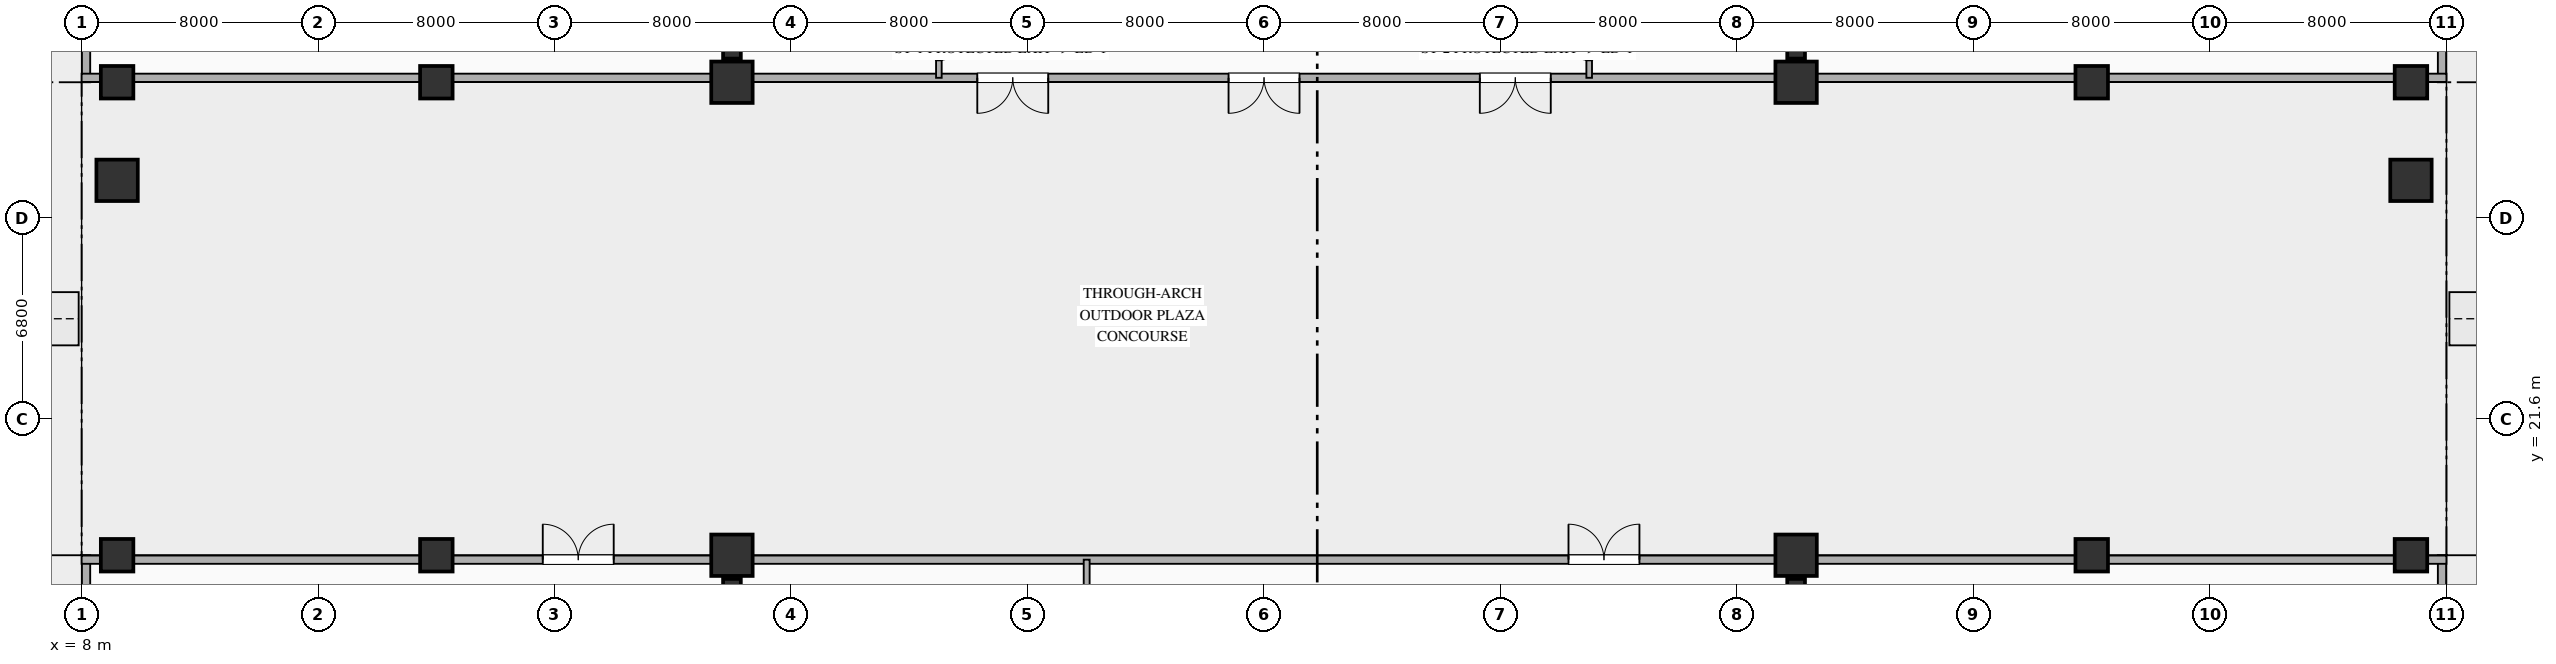
"""IFC4 building model, lengths in metres.
Left out: names, types, materials, properties, quantities, classifications, styles, units other than length and angle.
Written with IfcOpenShell. Run it as: python <this file> out.ifc"""

import sys

from ifc_helpers import new_model, si_unit, direction, frame, frame_2d, origin, origin_2d, place, context, subcontext, project, spatial, rectangle, extrude, element, fill, save


model = new_model("IFC4")
c1 = context("Model", 3, precision=1e-05, world=origin(), true_north=direction((0.0, 1.0)))
c2 = subcontext(c1, "Body", "Model", "MODEL_VIEW")
j1 = project(units=[si_unit("LENGTHUNIT", "METRE"), si_unit("PLANEANGLEUNIT", "RADIAN")], contexts=[c1])
p1 = place(None, origin())
s1 = spatial("IfcSite", under=j1, at=p1, CompositionType="ELEMENT")
p2 = place(p1, origin())
s2 = spatial("IfcBuilding", under=s1, at=p2, CompositionType="ELEMENT")
p3 = place(p2, origin())
s3 = spatial("IfcBuildingStorey", under=s2, at=p3, CompositionType="ELEMENT", Elevation=0.0)
for number, where, z_axis, x_axis in (
    (1, (9.2, 17.0, 0.0), (0.0, 0.0, 1.0), (1.0, 0.0, 0.0)),
    (2, (86.8, 17.0, 0.0), (0.0, 0.0, 1.0), (1.0, 0.0, 0.0)),
    (3, (9.2, 33.0, 0.0), (0.0, 0.0, 1.0), (1.0, 0.0, 0.0)),
    (4, (86.8, 33.0, 0.0), (0.0, 0.0, 1.0), (1.0, 0.0, 0.0)),
    (5, (20.0, 17.0, 0.0), (0.0, 0.0, 1.0), (1.0, 0.0, 0.0)),
):
    element("IfcColumn", number, at=place(p3, frame(where, z_axis=z_axis, x_axis=x_axis)), inside=s3, PredefinedType="COLUMN", context=c2, shape_type="SweptSolid", body=[
        extrude(rectangle(XDim=1.1, YDim=1.1, at=origin_2d()), origin(), (0.0, 0.0, 1.0), 5.72),
    ])
for number, where, z_axis, x_axis in (
    (6, (30.0, 17.0, 0.0), (0.0, 0.0, 1.0), (1.0, 0.0, 0.0)),
    (7, (66.0, 17.0, 0.0), (0.0, 0.0, 1.0), (1.0, 0.0, 0.0)),
):
    element("IfcColumn", number, at=place(p3, frame(where, z_axis=z_axis, x_axis=x_axis)), inside=s3, PredefinedType="COLUMN", context=c2, shape_type="SweptSolid", body=[
        extrude(rectangle(XDim=1.4, YDim=1.4, at=origin_2d()), origin(), (0.0, 0.0, 1.0), 5.72),
    ])
for number, where, z_axis, x_axis in (
    (8, (76.0, 17.0, 0.0), (0.0, 0.0, 1.0), (1.0, 0.0, 0.0)),
    (9, (20.0, 33.0, 0.0), (0.0, 0.0, 1.0), (1.0, 0.0, 0.0)),
):
    element("IfcColumn", number, at=place(p3, frame(where, z_axis=z_axis, x_axis=x_axis)), inside=s3, PredefinedType="COLUMN", context=c2, shape_type="SweptSolid", body=[
        extrude(rectangle(XDim=1.1, YDim=1.1, at=origin_2d()), origin(), (0.0, 0.0, 1.0), 5.72),
    ])
for number, where, z_axis, x_axis in (
    (10, (30.0, 33.0, 0.0), (0.0, 0.0, 1.0), (1.0, 0.0, 0.0)),
    (11, (66.0, 33.0, 0.0), (0.0, 0.0, 1.0), (1.0, 0.0, 0.0)),
):
    element("IfcColumn", number, at=place(p3, frame(where, z_axis=z_axis, x_axis=x_axis)), inside=s3, PredefinedType="COLUMN", context=c2, shape_type="SweptSolid", body=[
        extrude(rectangle(XDim=1.4, YDim=1.4, at=origin_2d()), origin(), (0.0, 0.0, 1.0), 5.72),
    ])
p4 = place(p3, frame((76.0, 33.0, 0.0), z_axis=(0.0, 0.0, 1.0), x_axis=(1.0, 0.0, 0.0)))
e12 = element("IfcColumn", 12, at=p4, inside=s3, PredefinedType="COLUMN", context=c2, shape_type="SweptSolid", body=[
    extrude(rectangle(XDim=1.1, YDim=1.1, at=origin_2d()), origin(), (0.0, 0.0, 1.0), 5.72),
])
for number, where, z_axis, x_axis in (
    (13, (9.2, 29.682, 0.0), (0.0, 0.0, 1.0), (1.0, 0.0, 0.0)),
    (14, (86.8, 29.682, 0.0), (0.0, 0.0, 1.0), (1.0, 0.0, 0.0)),
):
    element("IfcColumn", number, at=place(p3, frame(where, z_axis=z_axis, x_axis=x_axis)), inside=s3, PredefinedType="COLUMN", context=c2, shape_type="SweptSolid", body=[
        extrude(rectangle(XDim=1.4, YDim=1.4, at=origin_2d()), origin(), (0.0, 0.0, 1.0), 6.0),
    ])
for number, where, z_axis, x_axis in (
    (15, (30.0, 15.75, 0.0), (0.0, 0.0, 1.0), (1.0, 0.0, 0.0)),
    (16, (30.0, 34.25, 0.0), (0.0, 0.0, 1.0), (1.0, 0.0, 0.0)),
    (17, (66.0, 15.75, 0.0), (0.0, 0.0, 1.0), (1.0, 0.0, 0.0)),
    (18, (66.0, 34.25, 0.0), (0.0, 0.0, 1.0), (1.0, 0.0, 0.0)),
):
    element("IfcColumn", number, at=place(p3, frame(where, z_axis=z_axis, x_axis=x_axis)), inside=s3, PredefinedType="PILASTER", context=c2, shape_type="SweptSolid", body=[
        extrude(rectangle(XDim=0.6, YDim=0.9, at=origin_2d()), origin(), (0.0, 0.0, 1.0), 5.72),
    ])
p5 = place(p3, frame((8.15, 33.0, 0.0), z_axis=(0.0, 0.0, 1.0), x_axis=(0.0, 1.0, 0.0)))
e19 = element("IfcWall", 19, at=p5, inside=s3, PredefinedType="SOLIDWALL", context=c2, shape_type="SweptSolid", body=[
    extrude(rectangle(XDim=41.35, YDim=0.28, at=frame_2d((20.675, 0.0))), origin(), (0.0, 0.0, 1.0), 5.72),
])
p6 = place(p5, frame((33.6, 0.0, 0.0)))
e20 = element("IfcOpeningElement", 20, at=p6, cuts=e19, PredefinedType="OPENING", context=c2, shape_type="SweptSolid", body=[
    extrude(rectangle(XDim=2.4, YDim=2.6, at=frame_2d((1.2, 1.3))), frame((0.0, 0.15, 0.0), z_axis=(0.0, -1.0, 0.0), x_axis=(1.0, 0.0, 0.0)), (0.0, 0.0, 1.0), 0.3),
])
p7 = place(p5, frame((7.675, 0.0, 0.9)))
e21 = element("IfcOpeningElement", 21, at=p7, cuts=e19, PredefinedType="OPENING", context=c2, shape_type="SweptSolid", body=[
    extrude(rectangle(XDim=2.4, YDim=2.6, at=frame_2d((1.2, 1.3))), frame((0.0, 0.15, 0.0), z_axis=(0.0, -1.0, 0.0), x_axis=(1.0, 0.0, 0.0)), (0.0, 0.0, 1.0), 0.3),
])
p8 = place(p5, frame((21.225, 0.0, 0.9)))
e22 = element("IfcOpeningElement", 22, at=p8, cuts=e19, PredefinedType="OPENING", context=c2, shape_type="SweptSolid", body=[
    extrude(rectangle(XDim=2.4, YDim=2.6, at=frame_2d((1.2, 1.3))), frame((0.0, 0.15, 0.0), z_axis=(0.0, -1.0, 0.0), x_axis=(1.0, 0.0, 0.0)), (0.0, 0.0, 1.0), 0.3),
])
p9 = place(p3, frame((87.85, 74.35, 0.0), z_axis=(0.0, 0.0, 1.0), x_axis=(0.0, -1.0, 0.0)))
e23 = element("IfcWall", 23, at=p9, inside=s3, PredefinedType="SOLIDWALL", context=c2, shape_type="SweptSolid", body=[
    extrude(rectangle(XDim=41.35, YDim=0.28, at=frame_2d((20.675, 0.0))), origin(), (0.0, 0.0, 1.0), 5.72),
])
p10 = place(p9, frame((5.35, 0.0, 0.0)))
e24 = element("IfcOpeningElement", 24, at=p10, cuts=e23, PredefinedType="OPENING", context=c2, shape_type="SweptSolid", body=[
    extrude(rectangle(XDim=2.4, YDim=2.6, at=frame_2d((1.2, 1.3))), frame((0.0, 0.15, 0.0), z_axis=(0.0, -1.0, 0.0), x_axis=(1.0, 0.0, 0.0)), (0.0, 0.0, 1.0), 0.3),
])
p11 = place(p9, frame((14.15, 0.0, 0.0)))
e25 = element("IfcOpeningElement", 25, at=p11, cuts=e23, PredefinedType="OPENING", context=c2, shape_type="SweptSolid", body=[
    extrude(rectangle(XDim=4.2, YDim=4.2, at=frame_2d((2.1, 2.1))), frame((0.0, 0.15, 0.0), z_axis=(0.0, -1.0, 0.0), x_axis=(1.0, 0.0, 0.0)), (0.0, 0.0, 1.0), 0.3),
])
p12 = place(p9, frame((31.275, 0.0, 0.9)))
e26 = element("IfcOpeningElement", 26, at=p12, cuts=e23, PredefinedType="OPENING", context=c2, shape_type="SweptSolid", body=[
    extrude(rectangle(XDim=2.4, YDim=2.6, at=frame_2d((1.2, 1.3))), frame((0.0, 0.15, 0.0), z_axis=(0.0, -1.0, 0.0), x_axis=(1.0, 0.0, 0.0)), (0.0, 0.0, 1.0), 0.3),
])
for number, where, z_axis, x_axis in (
    (27, (8.15, 17.0, 0.0), (0.0, 0.0, 1.0), (0.0, -1.0, 0.0)),
    (28, (87.85, 9.65, 0.0), (0.0, 0.0, 1.0), (0.0, 1.0, 0.0)),
):
    element("IfcWall", number, at=place(p3, frame(where, z_axis=z_axis, x_axis=x_axis)), inside=s3, PredefinedType="SOLIDWALL", context=c2, shape_type="SweptSolid", body=[
        extrude(rectangle(XDim=7.35, YDim=0.28, at=frame_2d((3.675, 0.0))), origin(), (0.0, 0.0, 1.0), 5.72),
    ])
p13 = place(p3, frame((88.0, 33.15, 0.0), z_axis=(0.0, 0.0, 1.0), x_axis=(-1.0, 0.0, 0.0)))
e29 = element("IfcWall", 29, at=p13, inside=s3, PredefinedType="SOLIDWALL", context=c2, shape_type="SweptSolid", body=[
    extrude(rectangle(XDim=80.0, YDim=0.28, at=frame_2d((40.0, 0.0))), origin(), (0.0, 0.0, 1.0), 5.72),
])
p14 = place(p13, frame((47.3, 0.0, 0.0)))
e30 = element("IfcOpeningElement", 30, at=p14, cuts=e29, PredefinedType="OPENING", context=c2, shape_type="SweptSolid", body=[
    extrude(rectangle(XDim=2.4, YDim=2.6, at=frame_2d((1.2, 1.3))), frame((0.0, 0.15, 0.0), z_axis=(0.0, -1.0, 0.0), x_axis=(1.0, 0.0, 0.0)), (0.0, 0.0, 1.0), 0.3),
])
p15 = place(p13, frame((38.8, 0.0, 0.0)))
e31 = element("IfcOpeningElement", 31, at=p15, cuts=e29, PredefinedType="OPENING", context=c2, shape_type="SweptSolid", body=[
    extrude(rectangle(XDim=2.4, YDim=2.6, at=frame_2d((1.2, 1.3))), frame((0.0, 0.15, 0.0), z_axis=(0.0, -1.0, 0.0), x_axis=(1.0, 0.0, 0.0)), (0.0, 0.0, 1.0), 0.3),
])
p16 = place(p13, frame((30.3, 0.0, 0.0)))
e32 = element("IfcOpeningElement", 32, at=p16, cuts=e29, PredefinedType="OPENING", context=c2, shape_type="SweptSolid", body=[
    extrude(rectangle(XDim=2.4, YDim=2.6, at=frame_2d((1.2, 1.3))), frame((0.0, 0.15, 0.0), z_axis=(0.0, -1.0, 0.0), x_axis=(1.0, 0.0, 0.0)), (0.0, 0.0, 1.0), 0.3),
])
p17 = place(p3, frame((8.0, 16.85, 0.0), z_axis=(0.0, 0.0, 1.0), x_axis=(1.0, 0.0, 0.0)))
e33 = element("IfcWall", 33, at=p17, inside=s3, PredefinedType="SOLIDWALL", context=c2, shape_type="SweptSolid", body=[
    extrude(rectangle(XDim=80.0, YDim=0.28, at=frame_2d((40.0, 0.0))), origin(), (0.0, 0.0, 1.0), 5.72),
])
p18 = place(p17, frame((15.6, 0.0, 0.0)))
e34 = element("IfcOpeningElement", 34, at=p18, cuts=e33, PredefinedType="OPENING", context=c2, shape_type="SweptSolid", body=[
    extrude(rectangle(XDim=2.4, YDim=2.6, at=frame_2d((1.2, 1.3))), frame((0.0, 0.15, 0.0), z_axis=(0.0, -1.0, 0.0), x_axis=(1.0, 0.0, 0.0)), (0.0, 0.0, 1.0), 0.3),
])
p19 = place(p17, frame((50.3, 0.0, 0.0)))
e35 = element("IfcOpeningElement", 35, at=p19, cuts=e33, PredefinedType="OPENING", context=c2, shape_type="SweptSolid", body=[
    extrude(rectangle(XDim=2.4, YDim=2.6, at=frame_2d((1.2, 1.3))), frame((0.0, 0.15, 0.0), z_axis=(0.0, -1.0, 0.0), x_axis=(1.0, 0.0, 0.0)), (0.0, 0.0, 1.0), 0.3),
])
p20 = place(p3, frame((42.0, 16.85, 0.0), z_axis=(0.0, 0.0, 1.0), x_axis=(0.0, -1.0, 0.0)))
e36 = element("IfcWall", 36, at=p20, inside=s3, PredefinedType="PARTITIONING", context=c2, shape_type="SweptSolid", body=[
    extrude(rectangle(XDim=6.9, YDim=0.2, at=frame_2d((3.45, 0.0))), origin(), (0.0, 0.0, 1.0), 4.92),
])
p21 = place(p20, frame((2.85, 0.0, 0.0)))
e37 = element("IfcOpeningElement", 37, at=p21, cuts=e36, PredefinedType="OPENING", context=c2, shape_type="SweptSolid", body=[
    extrude(rectangle(XDim=1.2, YDim=2.25, at=frame_2d((0.6, 1.125))), frame((0.0, 0.11, 0.0), z_axis=(0.0, -1.0, 0.0), x_axis=(1.0, 0.0, 0.0)), (0.0, 0.0, 1.0), 0.22),
])
p22 = place(p3, frame((37.0, 35.232, 0.0), z_axis=(0.0, 0.0, 1.0), x_axis=(0.0, -1.0, 0.0)))
e38 = element("IfcWall", 38, at=p22, inside=s3, PredefinedType="PARTITIONING", context=c2, shape_type="SweptSolid", body=[
    extrude(rectangle(XDim=2.082, YDim=0.19, at=frame_2d((1.041, 0.0))), origin(), (0.0, 0.0, 1.0), 4.92),
])
p23 = place(p22, frame((0.591, 0.0, 0.0)))
e39 = element("IfcOpeningElement", 39, at=p23, cuts=e38, PredefinedType="OPENING", context=c2, shape_type="SweptSolid", body=[
    extrude(rectangle(XDim=0.9, YDim=2.15, at=frame_2d((0.45, 1.075))), frame((0.0, 0.105, 0.0), z_axis=(0.0, -1.0, 0.0), x_axis=(1.0, 0.0, 0.0)), (0.0, 0.0, 1.0), 0.21),
])
p24 = place(p3, frame((59.0, 33.15, 0.0), z_axis=(0.0, 0.0, 1.0), x_axis=(0.0, 1.0, 0.0)))
e40 = element("IfcWall", 40, at=p24, inside=s3, PredefinedType="PARTITIONING", context=c2, shape_type="SweptSolid", body=[
    extrude(rectangle(XDim=2.082, YDim=0.19, at=frame_2d((1.041, 0.0))), origin(), (0.0, 0.0, 1.0), 4.92),
])
p25 = place(p24, frame((0.591, 0.0, 0.0)))
e41 = element("IfcOpeningElement", 41, at=p25, cuts=e40, PredefinedType="OPENING", context=c2, shape_type="SweptSolid", body=[
    extrude(rectangle(XDim=0.9, YDim=2.15, at=frame_2d((0.45, 1.075))), frame((0.0, 0.105, 0.0), z_axis=(0.0, -1.0, 0.0), x_axis=(1.0, 0.0, 0.0)), (0.0, 0.0, 1.0), 0.21),
])
p26 = place(p14, origin())
e42 = element("IfcDoor", 42, at=p26, inside=s3, OperationType="DOUBLE_DOOR_SINGLE_SWING", PredefinedType="DOOR", context=c2, shape_type="SweptSolid", body=[
    extrude(rectangle(XDim=2.4, YDim=2.6, at=frame_2d((1.2, 1.3))), frame((0.0, 0.025, 0.0), z_axis=(0.0, -1.0, 0.0), x_axis=(1.0, 0.0, 0.0)), (0.0, 0.0, 1.0), 0.05),
])
fill(e30, e42)
p27 = place(p15, origin())
e43 = element("IfcDoor", 43, at=p27, inside=s3, OperationType="DOUBLE_DOOR_SINGLE_SWING", PredefinedType="DOOR", context=c2, shape_type="SweptSolid", body=[
    extrude(rectangle(XDim=2.4, YDim=2.6, at=frame_2d((1.2, 1.3))), frame((0.0, 0.025, 0.0), z_axis=(0.0, -1.0, 0.0), x_axis=(1.0, 0.0, 0.0)), (0.0, 0.0, 1.0), 0.05),
])
fill(e31, e43)
p28 = place(p16, origin())
e44 = element("IfcDoor", 44, at=p28, inside=s3, OperationType="DOUBLE_DOOR_SINGLE_SWING", PredefinedType="DOOR", context=c2, shape_type="SweptSolid", body=[
    extrude(rectangle(XDim=2.4, YDim=2.6, at=frame_2d((1.2, 1.3))), frame((0.0, 0.025, 0.0), z_axis=(0.0, -1.0, 0.0), x_axis=(1.0, 0.0, 0.0)), (0.0, 0.0, 1.0), 0.05),
])
fill(e32, e44)
p29 = place(p18, origin())
e45 = element("IfcDoor", 45, at=p29, inside=s3, OperationType="DOUBLE_DOOR_SINGLE_SWING", PredefinedType="DOOR", context=c2, shape_type="SweptSolid", body=[
    extrude(rectangle(XDim=2.4, YDim=2.6, at=frame_2d((1.2, 1.3))), frame((0.0, 0.025, 0.0), z_axis=(0.0, -1.0, 0.0), x_axis=(1.0, 0.0, 0.0)), (0.0, 0.0, 1.0), 0.05),
])
fill(e34, e45)
p30 = place(p19, origin())
e46 = element("IfcDoor", 46, at=p30, inside=s3, OperationType="DOUBLE_DOOR_SINGLE_SWING", PredefinedType="DOOR", context=c2, shape_type="SweptSolid", body=[
    extrude(rectangle(XDim=2.4, YDim=2.6, at=frame_2d((1.2, 1.3))), frame((0.0, 0.025, 0.0), z_axis=(0.0, -1.0, 0.0), x_axis=(1.0, 0.0, 0.0)), (0.0, 0.0, 1.0), 0.05),
])
fill(e35, e46)
p31 = place(p23, origin())
e47 = element("IfcDoor", 47, at=p31, inside=s3, OperationType="SINGLE_SWING_LEFT", PredefinedType="DOOR", context=c2, shape_type="SweptSolid", body=[
    extrude(rectangle(XDim=0.9, YDim=2.15, at=frame_2d((0.45, 1.075))), frame((0.0, 0.025, 0.0), z_axis=(0.0, -1.0, 0.0), x_axis=(1.0, 0.0, 0.0)), (0.0, 0.0, 1.0), 0.05),
])
fill(e39, e47)
p32 = place(p25, origin())
e48 = element("IfcDoor", 48, at=p32, inside=s3, OperationType="SINGLE_SWING_RIGHT", PredefinedType="DOOR", context=c2, shape_type="SweptSolid", body=[
    extrude(rectangle(XDim=0.9, YDim=2.15, at=frame_2d((0.45, 1.075))), frame((0.0, 0.025, 0.0), z_axis=(0.0, -1.0, 0.0), x_axis=(1.0, 0.0, 0.0)), (0.0, 0.0, 1.0), 0.05),
])
fill(e41, e48)
save(model, sys.argv[1])
